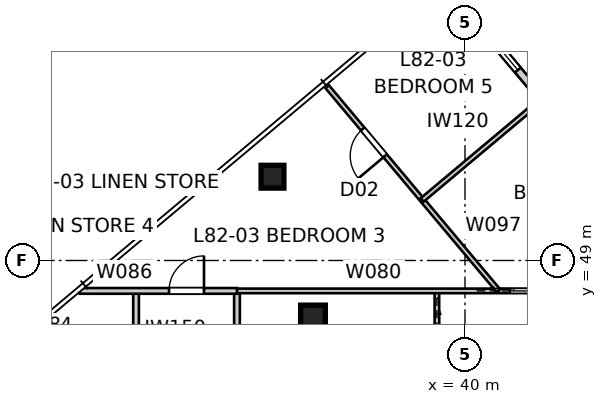
"""IFC4 building model, lengths in metres.
Left out: names, types, materials, properties, quantities, classifications, styles, units other than length and angle.
Written with IfcOpenShell. Run it as: python <this file> out.ifc"""

import sys

from ifc_helpers import new_model, si_unit, direction, frame, frame_2d, origin, origin_2d, place, context, subcontext, project, spatial, rectangle, extrude, element, fill, save


model = new_model("IFC4")
c1 = context("Model", 3, precision=1e-05, world=origin(), true_north=direction((0.0, 1.0)))
c2 = subcontext(c1, "Body", "Model", "MODEL_VIEW")
j1 = project(units=[si_unit("LENGTHUNIT", "METRE"), si_unit("PLANEANGLEUNIT", "RADIAN")], contexts=[c1])
p1 = place(None, origin())
s1 = spatial("IfcSite", under=j1, at=p1, CompositionType="ELEMENT")
p2 = place(p1, origin())
s2 = spatial("IfcBuilding", under=s1, at=p2, CompositionType="ELEMENT")
p3 = place(p2, frame((0.0, 0.0, 296.4)))
s3 = spatial("IfcBuildingStorey", under=s2, at=p3, CompositionType="ELEMENT", Elevation=296.4)
p4 = place(p3, frame((34.935, 51.205, 0.0), z_axis=(0.0, 0.0, 1.0), x_axis=(1.0, 0.0, 0.0)))
e1 = element("IfcColumn", 1, at=p4, inside=s3, PredefinedType="COLUMN", context=c2, shape_type="SweptSolid", body=[
    extrude(rectangle(XDim=0.6, YDim=0.6, at=origin_2d()), origin(), (0.0, 0.0, 1.0), 3.4),
])
p5 = place(p3, frame((36.0, 47.5, 0.0), z_axis=(0.0, 0.0, 1.0), x_axis=(1.0, 0.0, 0.0)))
e2 = element("IfcColumn", 2, at=p5, inside=s3, PredefinedType="COLUMN", context=c2, shape_type="SweptSolid", body=[
    extrude(rectangle(XDim=0.65, YDim=0.65, at=origin_2d()), origin(), (0.0, 0.0, 1.0), 3.4),
])
p6 = place(p3, frame((42.034, 53.246, 0.0), z_axis=(0.0, 0.0, 1.0), x_axis=(-0.642798342015, 0.766035437498, 0.0)))
e3 = element("IfcWall", 3, at=p6, inside=s3, PredefinedType="SOLIDWALL", context=c2, shape_type="SweptSolid", body=[
    extrude(rectangle(XDim=4.0, YDim=0.2, at=frame_2d((2.0, 0.0))), origin(), (0.0, 0.0, 1.0), 3.2),
])
p7 = place(p6, frame((1.0, 0.0, 0.45)))
e4 = element("IfcOpeningElement", 4, at=p7, cuts=e3, PredefinedType="OPENING", context=c2, shape_type="SweptSolid", body=[
    extrude(rectangle(XDim=2.0, YDim=1.8, at=frame_2d((1.0, 0.9))), frame((0.0, 0.11, 0.0), z_axis=(0.0, -1.0, 0.0), x_axis=(1.0, 0.0, 0.0)), (0.0, 0.0, 1.0), 0.22),
])
p8 = place(p3, frame((34.0, 42.1, 0.0), z_axis=(0.0, 0.0, 1.0), x_axis=(0.0, 1.0, 0.0)))
e5 = element("IfcWall", 5, at=p8, inside=s3, PredefinedType="SOLIDWALL", context=c2, shape_type="SweptSolid", body=[
    extrude(rectangle(XDim=6.1, YDim=0.15, at=frame_2d((3.05, 0.0))), origin(), (0.0, 0.0, 1.0), 3.2),
])
p9 = place(p8, frame((4.115, 0.0, 0.0)))
e6 = element("IfcOpeningElement", 6, at=p9, cuts=e5, PredefinedType="OPENING", context=c2, shape_type="SweptSolid", body=[
    extrude(rectangle(XDim=0.92, YDim=2.1, at=frame_2d((0.46, 1.05))), frame((0.0, 0.085, 0.0), z_axis=(0.0, -1.0, 0.0), x_axis=(1.0, 0.0, 0.0)), (0.0, 0.0, 1.0), 0.17),
])
p10 = place(p8, frame((1.045, 0.0, 0.0)))
e7 = element("IfcOpeningElement", 7, at=p10, cuts=e5, PredefinedType="OPENING", context=c2, shape_type="SweptSolid", body=[
    extrude(rectangle(XDim=0.96, YDim=2.1, at=frame_2d((0.48, 1.05))), frame((0.0, 0.085, 0.0), z_axis=(0.0, -1.0, 0.0), x_axis=(1.0, 0.0, 0.0)), (0.0, 0.0, 1.0), 0.17),
])
p11 = place(p3, frame((39.26, 48.2, 0.0), z_axis=(0.0, 0.0, 1.0), x_axis=(0.0, -1.0, 0.0)))
e8 = element("IfcWall", 8, at=p11, inside=s3, PredefinedType="PARTITIONING", context=c2, shape_type="SweptSolid", body=[
    extrude(rectangle(XDim=6.1, YDim=0.12, at=frame_2d((3.05, 0.0))), origin(), (0.0, 0.0, 1.0), 3.2),
])
p12 = place(p11, frame((1.045, 0.0, 0.0)))
e9 = element("IfcOpeningElement", 9, at=p12, cuts=e8, PredefinedType="OPENING", context=c2, shape_type="SweptSolid", body=[
    extrude(rectangle(XDim=0.96, YDim=2.1, at=frame_2d((0.48, 1.05))), frame((0.0, 0.07, 0.0), z_axis=(0.0, -1.0, 0.0), x_axis=(1.0, 0.0, 0.0)), (0.0, 0.0, 1.0), 0.14),
])
p13 = place(p11, frame((4.095, 0.0, 0.0)))
e10 = element("IfcOpeningElement", 10, at=p13, cuts=e8, PredefinedType="OPENING", context=c2, shape_type="SweptSolid", body=[
    extrude(rectangle(XDim=0.96, YDim=2.1, at=frame_2d((0.48, 1.05))), frame((0.0, 0.07, 0.0), z_axis=(0.0, -1.0, 0.0), x_axis=(1.0, 0.0, 0.0)), (0.0, 0.0, 1.0), 0.14),
])
p14 = place(p3, frame((34.0, 48.2, 0.0), z_axis=(0.0, 0.0, 1.0), x_axis=(1.0, 0.0, 0.0)))
e11 = element("IfcWall", 11, at=p14, inside=s3, PredefinedType="PARTITIONING", context=c2, shape_type="SweptSolid", body=[
    extrude(rectangle(XDim=17.437, YDim=0.12, at=frame_2d((8.718, 0.0))), origin(), (0.0, 0.0, 1.0), 3.2),
])
p15 = place(p14, frame((7.186, 0.0, 0.0)))
e12 = element("IfcOpeningElement", 12, at=p15, cuts=e11, PredefinedType="OPENING", context=c2, shape_type="SweptSolid", body=[
    extrude(rectangle(XDim=0.96, YDim=2.1, at=frame_2d((0.48, 1.05))), frame((0.0, 0.07, 0.0), z_axis=(0.0, -1.0, 0.0), x_axis=(1.0, 0.0, 0.0)), (0.0, 0.0, 1.0), 0.14),
])
p16 = place(p14, frame((12.867, 0.0, 0.0)))
e13 = element("IfcOpeningElement", 13, at=p16, cuts=e11, PredefinedType="OPENING", context=c2, shape_type="SweptSolid", body=[
    extrude(rectangle(XDim=0.92, YDim=2.34, at=frame_2d((0.46, 1.17))), frame((0.0, 0.07, 0.0), z_axis=(0.0, -1.0, 0.0), x_axis=(1.0, 0.0, 0.0)), (0.0, 0.0, 1.0), 0.14),
])
p17 = place(p3, frame((31.344, 48.2, 0.0), z_axis=(0.0, 0.0, 1.0), x_axis=(0.0, -1.0, 0.0)))
e14 = element("IfcWall", 14, at=p17, inside=s3, PredefinedType="SOLIDWALL", context=c2, shape_type="SweptSolid", body=[
    extrude(rectangle(XDim=1.992, YDim=0.15, at=frame_2d((0.996, 0.0))), origin(), (0.0, 0.0, 1.0), 3.2),
])
p18 = place(p3, frame((29.86, 48.2, 0.0), z_axis=(0.0, 0.0, 1.0), x_axis=(1.0, 0.0, 0.0)))
e15 = element("IfcWall", 15, at=p18, inside=s3, PredefinedType="SOLIDWALL", context=c2, shape_type="SweptSolid", body=[
    extrude(rectangle(XDim=4.141, YDim=0.15, at=frame_2d((2.07, 0.0))), origin(), (0.0, 0.0, 1.0), 3.2),
])
p19 = place(p18, frame((2.353, 0.0, 0.0)))
e16 = element("IfcOpeningElement", 16, at=p19, cuts=e15, PredefinedType="OPENING", context=c2, shape_type="SweptSolid", body=[
    extrude(rectangle(XDim=0.92, YDim=2.34, at=frame_2d((0.46, 1.17))), frame((0.0, 0.085, 0.0), z_axis=(0.0, -1.0, 0.0), x_axis=(1.0, 0.0, 0.0)), (0.0, 0.0, 1.0), 0.17),
])
p20 = place(p3, frame((40.883, 48.2, 0.0), z_axis=(0.0, 0.0, 1.0), x_axis=(-0.642790379821, 0.766042118691, 0.0)))
e17 = element("IfcWall", 17, at=p20, inside=s3, PredefinedType="PARTITIONING", context=c2, shape_type="SweptSolid", body=[
    extrude(rectangle(XDim=7.085, YDim=0.12, at=frame_2d((3.543, 0.0))), origin(), (0.0, 0.0, 1.0), 3.2),
])
p21 = place(p20, frame((4.64, 0.0, 0.0)))
e18 = element("IfcOpeningElement", 18, at=p21, cuts=e17, PredefinedType="OPENING", context=c2, shape_type="SweptSolid", body=[
    extrude(rectangle(XDim=0.92, YDim=2.34, at=frame_2d((0.46, 1.17))), frame((0.0, 0.07, 0.0), z_axis=(0.0, -1.0, 0.0), x_axis=(1.0, 0.0, 0.0)), (0.0, 0.0, 1.0), 0.14),
])
p22 = place(p3, frame((38.874, 50.594, 0.0), z_axis=(0.0, 0.0, 1.0), x_axis=(0.766061483953, 0.642767300664, 0.0)))
e19 = element("IfcWall", 19, at=p22, inside=s3, PredefinedType="PARTITIONING", context=c2, shape_type="SweptSolid", body=[
    extrude(rectangle(XDim=4.085, YDim=0.12, at=frame_2d((2.042, 0.0))), origin(), (0.0, 0.0, 1.0), 3.2),
])
p23 = place(p7, origin())
e20 = element("IfcWindow", 20, at=p23, inside=s3, PartitioningType="SINGLE_PANEL", PredefinedType="WINDOW", context=c2, shape_type="SweptSolid", body=[
    extrude(rectangle(XDim=2.0, YDim=1.8, at=frame_2d((1.0, 0.9))), frame((0.0, 0.03, 0.0), z_axis=(0.0, -1.0, 0.0), x_axis=(1.0, 0.0, 0.0)), (0.0, 0.0, 1.0), 0.06),
])
fill(e4, e20)
p24 = place(p19, origin())
e21 = element("IfcDoor", 21, at=p24, inside=s3, OperationType="SINGLE_SWING_RIGHT", PredefinedType="DOOR", context=c2, shape_type="SweptSolid", body=[
    extrude(rectangle(XDim=0.92, YDim=2.34, at=frame_2d((0.46, 1.17))), frame((0.0, 0.025, 0.0), z_axis=(0.0, -1.0, 0.0), x_axis=(1.0, 0.0, 0.0)), (0.0, 0.0, 1.0), 0.05),
])
fill(e16, e21)
p25 = place(p15, origin())
e22 = element("IfcDoor", 22, at=p25, inside=s3, OperationType="SLIDING_TO_LEFT", PredefinedType="DOOR", context=c2, shape_type="SweptSolid", body=[
    extrude(rectangle(XDim=0.96, YDim=2.1, at=frame_2d((0.48, 1.05))), frame((0.0, 0.025, 0.0), z_axis=(0.0, -1.0, 0.0), x_axis=(1.0, 0.0, 0.0)), (0.0, 0.0, 1.0), 0.05),
])
fill(e12, e22)
p26 = place(p21, origin())
e23 = element("IfcDoor", 23, at=p26, inside=s3, OperationType="SINGLE_SWING_LEFT", PredefinedType="DOOR", context=c2, shape_type="SweptSolid", body=[
    extrude(rectangle(XDim=0.92, YDim=2.34, at=frame_2d((0.46, 1.17))), frame((0.0, 0.025, 0.0), z_axis=(0.0, -1.0, 0.0), x_axis=(1.0, 0.0, 0.0)), (0.0, 0.0, 1.0), 0.05),
])
fill(e18, e23)
save(model, sys.argv[1])
